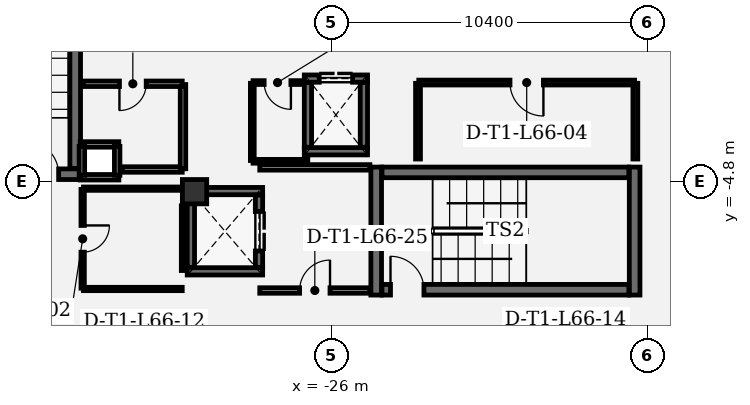
"""IFC4 building model, lengths in metres.
Left out: names, types, materials, properties, quantities, classifications, styles, units other than length and angle.
Written with IfcOpenShell. Run it as: python <this file> out.ifc"""

import sys

from ifc_helpers import new_model, si_unit, direction, frame, frame_2d, origin, origin_2d, place, context, subcontext, project, spatial, rectangle, extrude, element, fill, save


model = new_model("IFC4")
c1 = context("Model", 3, precision=1e-05, world=origin(), true_north=direction((0.0, 1.0)))
c2 = subcontext(c1, "Body", "Model", "MODEL_VIEW")
j1 = project(units=[si_unit("LENGTHUNIT", "METRE"), si_unit("PLANEANGLEUNIT", "RADIAN")], contexts=[c1])
p1 = place(None, origin())
s1 = spatial("IfcSite", under=j1, at=p1, CompositionType="ELEMENT")
p2 = place(p1, origin())
s2 = spatial("IfcBuilding", under=s1, at=p2, CompositionType="ELEMENT")
p3 = place(p2, frame((0.0, 0.0, 285.0)))
s3 = spatial("IfcBuildingStorey", under=s2, at=p3, CompositionType="ELEMENT", Elevation=285.0)
p4 = place(p3, frame((-30.5, -5.15, 0.0), z_axis=(0.0, 0.0, 1.0), x_axis=(1.0, 0.0, 0.0)))
e1 = element("IfcColumn", 1, at=p4, inside=s3, PredefinedType="COLUMN", context=c2, shape_type="SweptSolid", body=[
    extrude(rectangle(XDim=0.8, YDim=0.8, at=origin_2d()), origin(), (0.0, 0.0, 1.0), 4.2),
])
for number, where, z_axis, x_axis in (
    (2, (-24.525, -4.34, 0.0), (0.0, 0.0, 1.0), (0.0, -1.0, 0.0)),
    (3, (-16.025, -8.55, 0.0), (0.0, 0.0, 1.0), (0.0, 1.0, 0.0)),
):
    element("IfcWall", number, at=place(p3, frame(where, z_axis=z_axis, x_axis=x_axis)), inside=s3, PredefinedType="SHEAR", context=c2, shape_type="SweptSolid", body=[
        extrude(rectangle(XDim=4.21, YDim=0.35, at=frame_2d((2.105, 0.0))), origin(), (0.0, 0.0, 1.0), 3.91),
    ])
p5 = place(p3, frame((-24.335, -8.375, 0.0), z_axis=(0.0, 0.0, 1.0), x_axis=(1.0, 0.0, 0.0)))
e4 = element("IfcWall", 4, at=p5, inside=s3, PredefinedType="SHEAR", context=c2, shape_type="SweptSolid", body=[
    extrude(rectangle(XDim=8.12, YDim=0.35, at=frame_2d((4.06, 0.0))), origin(), (0.0, 0.0, 1.0), 3.91),
])
p6 = place(p5, frame((0.28, 0.0, 0.0)))
e5 = element("IfcOpeningElement", 5, at=p6, cuts=e4, PredefinedType="OPENING", context=c2, shape_type="SweptSolid", body=[
    extrude(rectangle(XDim=1.1, YDim=2.2, at=frame_2d((0.55, 1.1))), frame((0.0, 0.185, 0.0), z_axis=(0.0, -1.0, 0.0), x_axis=(1.0, 0.0, 0.0)), (0.0, 0.0, 1.0), 0.37),
])
p7 = place(p3, frame((-16.215, -4.515, 0.0), z_axis=(0.0, 0.0, 1.0), x_axis=(-1.0, 0.0, 0.0)))
e6 = element("IfcWall", 6, at=p7, inside=s3, PredefinedType="SHEAR", context=c2, shape_type="SweptSolid", body=[
    extrude(rectangle(XDim=8.12, YDim=0.35, at=frame_2d((4.06, 0.0))), origin(), (0.0, 0.0, 1.0), 3.91),
])
p8 = place(p3, frame((-38.46, -4.575, 0.0), z_axis=(0.0, 0.0, 1.0), x_axis=(1.0, 0.0, 0.0)))
e7 = element("IfcWall", 7, at=p8, inside=s3, PredefinedType="SHEAR", context=c2, shape_type="SweptSolid", body=[
    extrude(rectangle(XDim=4.21, YDim=0.35, at=frame_2d((2.105, 0.0))), origin(), (0.0, 0.0, 1.0), 3.91),
])
p9 = place(p8, frame((2.39, 0.0, 0.0)))
e8 = element("IfcOpeningElement", 8, at=p9, cuts=e7, PredefinedType="OPENING", context=c2, shape_type="SweptSolid", body=[
    extrude(rectangle(XDim=1.1, YDim=2.2, at=frame_2d((0.55, 1.1))), frame((0.0, 0.185, 0.0), z_axis=(0.0, -1.0, 0.0), x_axis=(1.0, 0.0, 0.0)), (0.0, 0.0, 1.0), 0.37),
])
p10 = place(p3, frame((-34.425, -4.385, 0.0), z_axis=(0.0, 0.0, 1.0), x_axis=(0.0, 1.0, 0.0)))
e9 = element("IfcWall", 9, at=p10, inside=s3, PredefinedType="SHEAR", context=c2, shape_type="SweptSolid", body=[
    extrude(rectangle(XDim=8.77, YDim=0.35, at=frame_2d((4.385, 0.0))), origin(), (0.0, 0.0, 1.0), 3.91),
])
for number, where, z_axis, x_axis in (
    (10, (-28.26, -7.77, 0.0), (0.0, 0.0, 1.0), (-1.0, 0.0, 0.0)),
    (11, (-30.74, -5.13, 0.0), (0.0, 0.0, 1.0), (1.0, 0.0, 0.0)),
):
    element("IfcWall", number, at=place(p3, frame(where, z_axis=z_axis, x_axis=x_axis)), inside=s3, PredefinedType="SHEAR", context=c2, shape_type="SweptSolid", body=[
        extrude(rectangle(XDim=2.48, YDim=0.24, at=frame_2d((1.24, 0.0))), origin(), (0.0, 0.0, 1.0), 3.91),
    ])
p11 = place(p3, frame((-30.62, -7.638, 0.0), z_axis=(0.0, 0.0, 1.0), x_axis=(0.0, 1.0, 0.0)))
e12 = element("IfcWall", 12, at=p11, inside=s3, PredefinedType="SHEAR", context=c2, shape_type="SweptSolid", body=[
    extrude(rectangle(XDim=2.376, YDim=0.24, at=frame_2d((1.188, 0.0))), origin(), (0.0, 0.0, 1.0), 3.91),
])
p12 = place(p3, frame((-28.38, -5.262, 0.0), z_axis=(0.0, 0.0, 1.0), x_axis=(0.0, -1.0, 0.0)))
e13 = element("IfcWall", 13, at=p12, inside=s3, PredefinedType="SHEAR", context=c2, shape_type="SweptSolid", body=[
    extrude(rectangle(XDim=2.376, YDim=0.24, at=frame_2d((1.188, 0.0))), origin(), (0.0, 0.0, 1.0), 3.91),
])
p13 = place(p12, frame((0.538, 0.0, 0.0)))
e14 = element("IfcOpeningElement", 14, at=p13, cuts=e13, PredefinedType="OPENING", context=c2, shape_type="SweptSolid", body=[
    extrude(rectangle(XDim=1.3, YDim=2.3, at=frame_2d((0.65, 1.15))), frame((0.0, 0.13, 0.0), z_axis=(0.0, -1.0, 0.0), x_axis=(1.0, 0.0, 0.0)), (0.0, 0.0, 1.0), 0.26),
])
p14 = place(p3, frame((-24.81, -3.82, 0.0), z_axis=(0.0, 0.0, 1.0), x_axis=(-1.0, 0.0, 0.0)))
e15 = element("IfcWall", 15, at=p14, inside=s3, PredefinedType="SHEAR", context=c2, shape_type="SweptSolid", body=[
    extrude(rectangle(XDim=2.08, YDim=0.24, at=frame_2d((1.04, 0.0))), origin(), (0.0, 0.0, 1.0), 3.91),
])
p15 = place(p3, frame((-26.89, -1.43, 0.0), z_axis=(0.0, 0.0, 1.0), x_axis=(1.0, 0.0, 0.0)))
e16 = element("IfcWall", 16, at=p15, inside=s3, PredefinedType="SHEAR", context=c2, shape_type="SweptSolid", body=[
    extrude(rectangle(XDim=2.08, YDim=0.24, at=frame_2d((1.04, 0.0))), origin(), (0.0, 0.0, 1.0), 3.91),
])
p16 = place(p15, frame((0.49, 0.0, 0.0)))
e17 = element("IfcOpeningElement", 17, at=p16, cuts=e16, PredefinedType="OPENING", context=c2, shape_type="SweptSolid", body=[
    extrude(rectangle(XDim=1.1, YDim=2.2, at=frame_2d((0.55, 1.1))), frame((0.0, 0.13, 0.0), z_axis=(0.0, -1.0, 0.0), x_axis=(1.0, 0.0, 0.0)), (0.0, 0.0, 1.0), 0.26),
])
for number, where, z_axis, x_axis in (
    (18, (-26.77, -3.688, 0.0), (0.0, 0.0, 1.0), (0.0, 1.0, 0.0)),
    (19, (-24.93, -1.562, 0.0), (0.0, 0.0, 1.0), (0.0, -1.0, 0.0)),
):
    element("IfcWall", number, at=place(p3, frame(where, z_axis=z_axis, x_axis=x_axis)), inside=s3, PredefinedType="SHEAR", context=c2, shape_type="SweptSolid", body=[
        extrude(rectangle(XDim=2.126, YDim=0.24, at=frame_2d((1.063, 0.0))), origin(), (0.0, 0.0, 1.0), 3.91),
    ])
for number, where, z_axis, x_axis in (
    (20, (-32.99, -4.675, 0.0), (0.0, 0.0, 1.0), (-1.0, 0.0, 0.0)),
    (21, (-34.26, -3.595, 0.0), (0.0, 0.0, 1.0), (1.0, 0.0, 0.0)),
):
    element("IfcWall", number, at=place(p3, frame(where, z_axis=z_axis, x_axis=x_axis)), inside=s3, PredefinedType="PARTITIONING", context=c2, shape_type="SweptSolid", body=[
        extrude(rectangle(XDim=1.27, YDim=0.18, at=frame_2d((0.635, 0.0))), origin(), (0.0, 0.0, 1.0), 3.91),
    ])
for number, where, z_axis, x_axis in (
    (22, (-34.205, -4.61, 0.0), (0.0, 0.0, 1.0), (0.0, 1.0, 0.0)),
    (23, (-33.045, -3.66, 0.0), (0.0, 0.0, 1.0), (0.0, -1.0, 0.0)),
):
    element("IfcWall", number, at=place(p3, frame(where, z_axis=z_axis, x_axis=x_axis)), inside=s3, PredefinedType="PARTITIONING", context=c2, shape_type="SweptSolid", body=[
        extrude(rectangle(XDim=0.95, YDim=0.18, at=frame_2d((0.475, 0.0))), origin(), (0.0, 0.0, 1.0), 3.91),
    ])
p17 = place(p3, frame((-28.355, -8.4, 0.0), z_axis=(0.0, 0.0, 1.0), x_axis=(1.0, 0.0, 0.0)))
e24 = element("IfcWall", 24, at=p17, inside=s3, PredefinedType="PARTITIONING", context=c2, shape_type="SweptSolid", body=[
    extrude(rectangle(XDim=3.622, YDim=0.18, at=frame_2d((1.811, 0.0))), origin(), (0.0, 0.0, 1.0), 3.529),
])
p18 = place(p17, frame((1.311, 0.0, 0.0)))
e25 = element("IfcOpeningElement", 25, at=p18, cuts=e24, PredefinedType="OPENING", context=c2, shape_type="SweptSolid", body=[
    extrude(rectangle(XDim=1.0, YDim=2.15, at=frame_2d((0.5, 1.075))), frame((0.0, 0.1, 0.0), z_axis=(0.0, -1.0, 0.0), x_axis=(1.0, 0.0, 0.0)), (0.0, 0.0, 1.0), 0.2),
])
p19 = place(p3, frame((-24.733, -4.35, 0.0), z_axis=(0.0, 0.0, 1.0), x_axis=(-1.0, 0.0, 0.0)))
e26 = element("IfcWall", 26, at=p19, inside=s3, PredefinedType="PARTITIONING", context=c2, shape_type="SweptSolid", body=[
    extrude(rectangle(XDim=3.622, YDim=0.18, at=frame_2d((1.811, 0.0))), origin(), (0.0, 0.0, 1.0), 3.91),
])
p20 = place(p3, frame((-34.155, -8.35, 0.0), z_axis=(0.0, 0.0, 1.0), x_axis=(1.0, 0.0, 0.0)))
e27 = element("IfcWall", 27, at=p20, inside=s3, PredefinedType="PARTITIONING", context=c2, shape_type="SweptSolid", body=[
    extrude(rectangle(XDim=3.25, YDim=0.11, at=frame_2d((1.625, 0.0))), origin(), (0.0, 0.0, 1.0), 3.13),
])
p21 = place(p3, frame((-30.88, -7.743, 0.0), z_axis=(0.0, 0.0, 1.0), x_axis=(0.0, 1.0, 0.0)))
e28 = element("IfcWall", 28, at=p21, inside=s3, PredefinedType="PARTITIONING", context=c2, shape_type="SweptSolid", body=[
    extrude(rectangle(XDim=2.128, YDim=0.11, at=frame_2d((1.064, 0.0))), origin(), (0.0, 0.0, 1.0), 3.91),
])
p22 = place(p3, frame((-30.965, -5.05, 0.0), z_axis=(0.0, 0.0, 1.0), x_axis=(-1.0, 0.0, 0.0)))
e29 = element("IfcWall", 29, at=p22, inside=s3, PredefinedType="PARTITIONING", context=c2, shape_type="SweptSolid", body=[
    extrude(rectangle(XDim=3.19, YDim=0.11, at=frame_2d((1.595, 0.0))), origin(), (0.0, 0.0, 1.0), 3.91),
])
p23 = place(p3, frame((-34.18, -5.075, 0.0), z_axis=(0.0, 0.0, 1.0), x_axis=(0.0, -1.0, 0.0)))
e30 = element("IfcWall", 30, at=p23, inside=s3, PredefinedType="PARTITIONING", context=c2, shape_type="SweptSolid", body=[
    extrude(rectangle(XDim=3.25, YDim=0.11, at=frame_2d((1.625, 0.0))), origin(), (0.0, 0.0, 1.0), 3.91),
])
p24 = place(p23, frame((1.185, 0.0, 0.0)))
e31 = element("IfcOpeningElement", 31, at=p24, cuts=e30, PredefinedType="OPENING", context=c2, shape_type="SweptSolid", body=[
    extrude(rectangle(XDim=0.88, YDim=2.1, at=frame_2d((0.44, 1.05))), frame((0.0, 0.065, 0.0), z_axis=(0.0, -1.0, 0.0), x_axis=(1.0, 0.0, 0.0)), (0.0, 0.0, 1.0), 0.13),
])
for number, where, z_axis, x_axis in (
    (32, (-23.15, -1.585, 0.0), (0.0, 0.0, 1.0), (0.0, -1.0, 0.0)),
    (33, (-16.0, -4.075, 0.0), (0.0, 0.0, 1.0), (0.0, 1.0, 0.0)),
):
    element("IfcWall", number, at=place(p3, frame(where, z_axis=z_axis, x_axis=x_axis)), inside=s3, PredefinedType="PARTITIONING", context=c2, shape_type="SweptSolid", body=[
        extrude(rectangle(XDim=2.49, YDim=0.16, at=frame_2d((1.245, 0.0))), origin(), (0.0, 0.0, 1.0), 3.91),
    ])
p25 = place(p3, frame((-16.025, -1.56, 0.0), z_axis=(0.0, 0.0, 1.0), x_axis=(-1.0, 0.0, 0.0)))
e34 = element("IfcWall", 34, at=p25, inside=s3, PredefinedType="PARTITIONING", context=c2, shape_type="SweptSolid", body=[
    extrude(rectangle(XDim=7.1, YDim=0.16, at=frame_2d((3.55, 0.0))), origin(), (0.0, 0.0, 1.0), 3.91),
])
p26 = place(p25, frame((3.0, 0.0, 0.0)))
e35 = element("IfcOpeningElement", 35, at=p26, cuts=e34, PredefinedType="OPENING", context=c2, shape_type="SweptSolid", body=[
    extrude(rectangle(XDim=1.1, YDim=2.15, at=frame_2d((0.55, 1.075))), frame((0.0, 0.09, 0.0), z_axis=(0.0, -1.0, 0.0), x_axis=(1.0, 0.0, 0.0)), (0.0, 0.0, 1.0), 0.18),
])
p27 = place(p3, frame((-28.6, -1.585, 0.0), z_axis=(0.0, 0.0, 1.0), x_axis=(0.0, -1.0, 0.0)))
e36 = element("IfcWall", 36, at=p27, inside=s3, PredefinedType="PARTITIONING", context=c2, shape_type="SweptSolid", body=[
    extrude(rectangle(XDim=2.54, YDim=0.125, at=frame_2d((1.27, 0.0))), origin(), (0.0, 0.0, 1.0), 3.91),
])
p28 = place(p3, frame((-28.575, -4.15, 0.0), z_axis=(0.0, 0.0, 1.0), x_axis=(1.0, 0.0, 0.0)))
e37 = element("IfcWall", 37, at=p28, inside=s3, PredefinedType="PARTITIONING", context=c2, shape_type="SweptSolid", body=[
    extrude(rectangle(XDim=1.8, YDim=0.125, at=frame_2d((0.9, 0.0))), origin(), (0.0, 0.0, 1.0), 3.91),
])
p29 = place(p3, frame((-26.966, -1.56, 0.0), z_axis=(0.0, 0.0, 1.0), x_axis=(-1.0, 0.0, 0.0)))
e38 = element("IfcWall", 38, at=p29, inside=s3, PredefinedType="PARTITIONING", context=c2, shape_type="SweptSolid", body=[
    extrude(rectangle(XDim=1.609, YDim=0.125, at=frame_2d((0.805, 0.0))), origin(), (0.0, 0.0, 1.0), 3.91),
])
p30 = place(p29, frame((0.365, 0.0, 0.0)))
e39 = element("IfcOpeningElement", 39, at=p30, cuts=e38, PredefinedType="OPENING", context=c2, shape_type="SweptSolid", body=[
    extrude(rectangle(XDim=0.88, YDim=2.1, at=frame_2d((0.44, 1.05))), frame((0.0, 0.073, 0.0), z_axis=(0.0, -1.0, 0.0), x_axis=(1.0, 0.0, 0.0)), (0.0, 0.0, 1.0), 0.145),
])
p31 = place(p3, frame((-32.88, -4.42, 0.0), z_axis=(0.0, 0.0, 1.0), x_axis=(1.0, 0.0, 0.0)))
e40 = element("IfcWall", 40, at=p31, inside=s3, PredefinedType="PARTITIONING", context=c2, shape_type="SweptSolid", body=[
    extrude(rectangle(XDim=1.975, YDim=0.18, at=frame_2d((0.988, 0.0))), origin(), (0.0, 0.0, 1.0), 3.91),
])
p32 = place(p3, frame((-30.88, -4.395, 0.0), z_axis=(0.0, 0.0, 1.0), x_axis=(0.0, 1.0, 0.0)))
e41 = element("IfcWall", 41, at=p32, inside=s3, PredefinedType="PARTITIONING", context=c2, shape_type="SweptSolid", body=[
    extrude(rectangle(XDim=2.77, YDim=0.18, at=frame_2d((1.385, 0.0))), origin(), (0.0, 0.0, 1.0), 3.91),
])
p33 = place(p3, frame((-30.905, -1.6, 0.0), z_axis=(0.0, 0.0, 1.0), x_axis=(-1.0, 0.0, 0.0)))
e42 = element("IfcWall", 42, at=p33, inside=s3, PredefinedType="PARTITIONING", context=c2, shape_type="SweptSolid", body=[
    extrude(rectangle(XDim=3.25, YDim=0.18, at=frame_2d((1.625, 0.0))), origin(), (0.0, 0.0, 1.0), 3.91),
])
p34 = place(p33, frame((1.185, 0.0, 0.0)))
e43 = element("IfcOpeningElement", 43, at=p34, cuts=e42, PredefinedType="OPENING", context=c2, shape_type="SweptSolid", body=[
    extrude(rectangle(XDim=0.88, YDim=2.1, at=frame_2d((0.44, 1.05))), frame((0.0, 0.1, 0.0), z_axis=(0.0, -1.0, 0.0), x_axis=(1.0, 0.0, 0.0)), (0.0, 0.0, 1.0), 0.2),
])
p35 = place(p6, origin())
e44 = element("IfcDoor", 44, at=p35, inside=s3, OperationType="SINGLE_SWING_LEFT", PredefinedType="DOOR", context=c2, shape_type="SweptSolid", body=[
    extrude(rectangle(XDim=1.1, YDim=2.2, at=frame_2d((0.55, 1.1))), frame((0.0, 0.025, 0.0), z_axis=(0.0, -1.0, 0.0), x_axis=(1.0, 0.0, 0.0)), (0.0, 0.0, 1.0), 0.05),
])
fill(e5, e44)
p36 = place(p9, origin())
e45 = element("IfcDoor", 45, at=p36, inside=s3, OperationType="SINGLE_SWING_LEFT", PredefinedType="DOOR", context=c2, shape_type="SweptSolid", body=[
    extrude(rectangle(XDim=1.1, YDim=2.2, at=frame_2d((0.55, 1.1))), frame((0.0, 0.025, 0.0), z_axis=(0.0, -1.0, 0.0), x_axis=(1.0, 0.0, 0.0)), (0.0, 0.0, 1.0), 0.05),
])
fill(e8, e45)
p37 = place(p13, origin())
e46 = element("IfcDoor", 46, at=p37, inside=s3, OperationType="DOUBLE_DOOR_SLIDING", PredefinedType="DOOR", context=c2, shape_type="SweptSolid", body=[
    extrude(rectangle(XDim=1.3, YDim=2.3, at=frame_2d((0.65, 1.15))), frame((0.0, 0.025, 0.0), z_axis=(0.0, -1.0, 0.0), x_axis=(1.0, 0.0, 0.0)), (0.0, 0.0, 1.0), 0.05),
])
fill(e14, e46)
p38 = place(p16, origin())
e47 = element("IfcDoor", 47, at=p38, inside=s3, OperationType="DOUBLE_DOOR_SLIDING", PredefinedType="DOOR", context=c2, shape_type="SweptSolid", body=[
    extrude(rectangle(XDim=1.1, YDim=2.2, at=frame_2d((0.55, 1.1))), frame((0.0, 0.025, 0.0), z_axis=(0.0, -1.0, 0.0), x_axis=(1.0, 0.0, 0.0)), (0.0, 0.0, 1.0), 0.05),
])
fill(e17, e47)
p39 = place(p24, origin())
e48 = element("IfcDoor", 48, at=p39, inside=s3, OperationType="SINGLE_SWING_LEFT", PredefinedType="DOOR", context=c2, shape_type="SweptSolid", body=[
    extrude(rectangle(XDim=0.88, YDim=2.1, at=frame_2d((0.44, 1.05))), frame((0.0, 0.025, 0.0), z_axis=(0.0, -1.0, 0.0), x_axis=(1.0, 0.0, 0.0)), (0.0, 0.0, 1.0), 0.05),
])
fill(e31, e48)
p40 = place(p26, origin())
e49 = element("IfcDoor", 49, at=p40, inside=s3, OperationType="SINGLE_SWING_LEFT", PredefinedType="DOOR", context=c2, shape_type="SweptSolid", body=[
    extrude(rectangle(XDim=1.1, YDim=2.15, at=frame_2d((0.55, 1.075))), frame((0.0, 0.025, 0.0), z_axis=(0.0, -1.0, 0.0), x_axis=(1.0, 0.0, 0.0)), (0.0, 0.0, 1.0), 0.05),
])
fill(e35, e49)
p41 = place(p30, origin())
e50 = element("IfcDoor", 50, at=p41, inside=s3, OperationType="SINGLE_SWING_LEFT", PredefinedType="DOOR", context=c2, shape_type="SweptSolid", body=[
    extrude(rectangle(XDim=0.88, YDim=2.1, at=frame_2d((0.44, 1.05))), frame((0.0, 0.025, 0.0), z_axis=(0.0, -1.0, 0.0), x_axis=(1.0, 0.0, 0.0)), (0.0, 0.0, 1.0), 0.05),
])
fill(e39, e50)
p42 = place(p34, origin())
e51 = element("IfcDoor", 51, at=p42, inside=s3, OperationType="SINGLE_SWING_RIGHT", PredefinedType="DOOR", context=c2, shape_type="SweptSolid", body=[
    extrude(rectangle(XDim=0.88, YDim=2.1, at=frame_2d((0.44, 1.05))), frame((0.0, 0.025, 0.0), z_axis=(0.0, -1.0, 0.0), x_axis=(1.0, 0.0, 0.0)), (0.0, 0.0, 1.0), 0.05),
])
fill(e43, e51)
p43 = place(p18, origin())
e52 = element("IfcDoor", 52, at=p43, inside=s3, OperationType="SINGLE_SWING_RIGHT", PredefinedType="DOOR", context=c2, shape_type="SweptSolid", body=[
    extrude(rectangle(XDim=1.0, YDim=2.15, at=frame_2d((0.5, 1.075))), frame((0.0, 0.025, 0.0), z_axis=(0.0, -1.0, 0.0), x_axis=(1.0, 0.0, 0.0)), (0.0, 0.0, 1.0), 0.05),
])
fill(e25, e52)
save(model, sys.argv[1])
